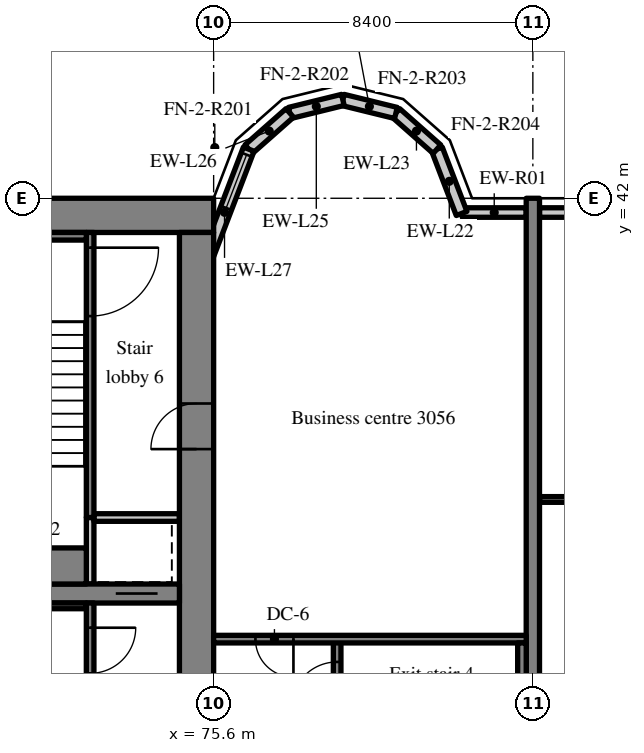
"""IFC4 building model, lengths in metres.
Left out: names, types, materials, properties, quantities, classifications, styles, units other than length and angle.
Written with IfcOpenShell. Run it as: python <this file> out.ifc"""

import sys

from ifc_helpers import new_model, si_unit, direction, frame, frame_2d, origin, place, context, subcontext, project, spatial, rectangle, extrude, source, transform, mapped, element, fill, save


model = new_model("IFC4")
c1 = context("Model", 3, precision=1e-05, world=origin(), true_north=direction((0.0, 1.0)))
c2 = subcontext(c1, "Body", "Model", "MODEL_VIEW")
j1 = project(units=[si_unit("LENGTHUNIT", "METRE"), si_unit("PLANEANGLEUNIT", "RADIAN")], contexts=[c1])
p1 = place(None, origin())
s1 = spatial("IfcSite", under=j1, at=p1, CompositionType="ELEMENT")
p2 = place(p1, origin())
s2 = spatial("IfcBuilding", under=s1, at=p2, CompositionType="ELEMENT")
p3 = place(p2, frame((0.0, 0.0, 125.6)))
s3 = spatial("IfcBuildingStorey", under=s2, at=p3, CompositionType="ELEMENT", Elevation=125.6)
m1 = source(origin(), c2, "Body", "SweptSolid", [
    extrude(rectangle(XDim=50.4, YDim=0.9, at=frame_2d((25.2, 0.0))), origin(), (0.0, 0.0, 1.0), 3.52),
])
p4 = place(p3, frame((25.2, 41.55, 0.0), z_axis=(0.0, 0.0, 1.0), x_axis=(1.0, 0.0, 0.0)))
e1 = element("IfcWall", 1, at=p4, inside=s3, PredefinedType="SHEAR", context=c2, shape_type="MappedRepresentation", body=[
    mapped(m1, transform((0.0, 0.0, 0.0), scale=1.0)),
])
m2 = source(origin(), c2, "Body", "SweptSolid", [
    extrude(rectangle(XDim=18.2, YDim=0.9, at=frame_2d((9.1, 0.0))), origin(), (0.0, 0.0, 1.0), 3.52),
])
p5 = place(p3, frame((75.15, 22.9, 0.0), z_axis=(0.0, 0.0, 1.0), x_axis=(0.0, 1.0, 0.0)))
e2 = element("IfcWall", 2, at=p5, inside=s3, PredefinedType="SHEAR", context=c2, shape_type="MappedRepresentation", body=[
    mapped(m2, transform((0.0, 0.0, 0.0), scale=1.0)),
])
m3 = source(origin(), c2, "Body", "SweptSolid", [
    extrude(rectangle(XDim=1.2, YDim=2.1, at=frame_2d((0.6, 1.05))), frame((0.0, 0.46, 0.0), z_axis=(0.0, -1.0, 0.0), x_axis=(1.0, 0.0, 0.0)), (0.0, 0.0, 1.0), 0.92),
])
p6 = place(p5, frame((12.5, 0.0, 0.0)))
e3 = element("IfcOpeningElement", 3, at=p6, cuts=e2, PredefinedType="OPENING", context=c2, shape_type="MappedRepresentation", body=[
    mapped(m3, transform((0.0, 0.0, 0.0), scale=1.0)),
])
m4 = source(origin(), c2, "Body", "SweptSolid", [
    extrude(rectangle(XDim=7.25, YDim=0.5, at=frame_2d((3.625, 0.0))), origin(), (0.0, 0.0, 1.0), 3.52),
])
p7 = place(p3, frame((67.45, 31.6, 0.0), z_axis=(0.0, 0.0, 1.0), x_axis=(1.0, 0.0, 0.0)))
e4 = element("IfcWall", 4, at=p7, inside=s3, PredefinedType="SHEAR", context=c2, shape_type="MappedRepresentation", body=[
    mapped(m4, transform((0.0, 0.0, 0.0), scale=1.0)),
])
m5 = source(origin(), c2, "Body", "SweptSolid", [
    extrude(rectangle(XDim=1.1, YDim=2.1, at=frame_2d((0.55, 1.05))), frame((0.0, 0.26, 0.0), z_axis=(0.0, -1.0, 0.0), x_axis=(1.0, 0.0, 0.0)), (0.0, 0.0, 1.0), 0.52),
])
p8 = place(p7, frame((5.575, 0.0, 0.0)))
e5 = element("IfcOpeningElement", 5, at=p8, cuts=e4, PredefinedType="OPENING", context=c2, shape_type="MappedRepresentation", body=[
    mapped(m5, transform((0.0, 0.0, 0.0), scale=1.0)),
])
m6 = source(origin(), c2, "Body", "SweptSolid", [
    extrude(rectangle(XDim=20.0, YDim=0.35, at=frame_2d((10.0, 0.0))), origin(), (0.0, 0.0, 1.0), 3.52),
])
p9 = place(p3, frame((84.0, 22.0, 0.0), z_axis=(0.0, 0.0, 1.0), x_axis=(0.0, 1.0, 0.0)))
e6 = element("IfcWall", 6, at=p9, inside=s3, PredefinedType="SHEAR", context=c2, shape_type="MappedRepresentation", body=[
    mapped(m6, transform((0.0, 0.0, 0.0), scale=1.0)),
])
m7 = source(origin(), c2, "Body", "SweptSolid", [
    extrude(rectangle(XDim=1.683, YDim=0.25, at=frame_2d((0.841, 0.0))), origin(), (0.0, 0.0, 1.0), 2.82),
])
p10 = place(p3, frame((83.825, 41.625, 0.0), z_axis=(0.0, 0.0, 1.0), x_axis=(-1.0, 0.0, 0.0)))
e7 = element("IfcWall", 7, at=p10, inside=s3, PredefinedType="SOLIDWALL", context=c2, shape_type="MappedRepresentation", body=[
    mapped(m7, transform((0.0, 0.0, 0.0), scale=1.0)),
])
m8 = source(origin(), c2, "Body", "SweptSolid", [
    extrude(rectangle(XDim=3.675, YDim=0.25, at=frame_2d((1.837, 0.0))), origin(), (0.0, 0.0, 1.0), 2.82),
])
p11 = place(p3, frame((87.85, 41.625, 0.0), z_axis=(0.0, 0.0, 1.0), x_axis=(-1.0, 0.0, 0.0)))
e8 = element("IfcWall", 8, at=p11, inside=s3, PredefinedType="SOLIDWALL", context=c2, shape_type="MappedRepresentation", body=[
    mapped(m8, transform((0.0, 0.0, 0.0), scale=1.0)),
])
m9 = source(origin(), c2, "Body", "SweptSolid", [
    extrude(rectangle(XDim=1.5, YDim=1.5, at=frame_2d((0.75, 0.75))), frame((0.0, 0.135, 0.0), z_axis=(0.0, -1.0, 0.0), x_axis=(1.0, 0.0, 0.0)), (0.0, 0.0, 1.0), 0.27),
])
p12 = place(p11, frame((1.087, 0.0, 0.9)))
e9 = element("IfcOpeningElement", 9, at=p12, cuts=e8, PredefinedType="OPENING", context=c2, shape_type="MappedRepresentation", body=[
    mapped(m9, transform((0.0, 0.0, 0.0), scale=1.0)),
])
m10 = source(origin(), c2, "Body", "SweptSolid", [
    extrude(rectangle(XDim=1.812, YDim=0.3, at=frame_2d((0.906, 0.0))), origin(), (0.0, 0.0, 1.0), 3.52),
])
p13 = place(p3, frame((82.125, 41.6, 0.0), z_axis=(0.0, 0.0, 1.0), x_axis=(-0.357877270961, 0.93376863244, 0.0)))
e10 = element("IfcWall", 10, at=p13, inside=s3, PredefinedType="SOLIDWALL", context=c2, shape_type="MappedRepresentation", body=[
    mapped(m10, transform((0.0, 0.0, 0.0), scale=1.0)),
])
m11 = source(origin(), c2, "Body", "SweptSolid", [
    extrude(rectangle(XDim=1.44, YDim=0.3, at=frame_2d((0.72, 0.0))), origin(), (0.0, 0.0, 1.0), 3.52),
])
p14 = place(p3, frame((81.477, 43.292, 0.0), z_axis=(0.0, 0.0, 1.0), x_axis=(-0.74957555648, 0.661918790432, 0.0)))
e11 = element("IfcWall", 11, at=p14, inside=s3, PredefinedType="SOLIDWALL", context=c2, shape_type="MappedRepresentation", body=[
    mapped(m11, transform((0.0, 0.0, 0.0), scale=1.0)),
])
m12 = source(origin(), c2, "Body", "SweptSolid", [
    extrude(rectangle(XDim=1.439, YDim=0.3, at=frame_2d((0.719, 0.0))), origin(), (0.0, 0.0, 1.0), 3.52),
])
for number, where, z_axis, x_axis in (
    (12, (80.397, 44.245, 0.0), (0.0, 0.0, 1.0), (-0.971, 0.238, 0.0)),
    (13, (79.0, 44.588, 0.0), (0.0, 0.0, 1.0), (-0.971, -0.238, 0.0)),
):
    element("IfcWall", number, at=place(p3, frame(where, z_axis=z_axis, x_axis=x_axis)), inside=s3, PredefinedType="SOLIDWALL", context=c2, shape_type="MappedRepresentation", body=[
        mapped(m12, transform((0.0, 0.0, 0.0), scale=1.0)),
    ])
p15 = place(p3, frame((77.603, 44.245, 0.0), z_axis=(0.0, 0.0, 1.0), x_axis=(-0.74957555648, -0.661918790432, 0.0)))
e14 = element("IfcWall", 14, at=p15, inside=s3, PredefinedType="SOLIDWALL", context=c2, shape_type="MappedRepresentation", body=[
    mapped(m11, transform((0.0, 0.0, 0.0), scale=1.0)),
])
m13 = source(origin(), c2, "Body", "SweptSolid", [
    extrude(rectangle(XDim=3.559, YDim=0.3, at=frame_2d((1.78, 0.0))), origin(), (0.0, 0.0, 1.0), 3.52),
])
p16 = place(p3, frame((76.523, 43.292, 0.0), z_axis=(0.0, 0.0, 1.0), x_axis=(-0.35779745313, -0.933799219604, 0.0)))
e15 = element("IfcWall", 15, at=p16, inside=s3, PredefinedType="SOLIDWALL", context=c2, shape_type="MappedRepresentation", body=[
    mapped(m13, transform((0.0, 0.0, 0.0), scale=1.0)),
])
m14 = source(origin(), c2, "Body", "SweptSolid", [
    extrude(rectangle(XDim=1.5, YDim=2.0, at=frame_2d((0.75, 1.0))), frame((0.0, 0.16, 0.0), z_axis=(0.0, -1.0, 0.0), x_axis=(1.0, 0.0, 0.0)), (0.0, 0.0, 1.0), 0.32),
])
p17 = place(p16, frame((0.156, 0.0, 0.9)))
e16 = element("IfcOpeningElement", 16, at=p17, cuts=e15, PredefinedType="OPENING", context=c2, shape_type="MappedRepresentation", body=[
    mapped(m14, transform((0.0, 0.0, 0.0), scale=1.0)),
])
m15 = source(origin(), c2, "Body", "SweptSolid", [
    extrude(rectangle(XDim=8.45, YDim=0.2, at=frame_2d((4.225, 0.0))), origin(), (0.0, 0.0, 1.0), 3.52),
])
p18 = place(p3, frame((72.35, 22.9, 0.0), z_axis=(0.0, 0.0, 1.0), x_axis=(0.0, 1.0, 0.0)))
e17 = element("IfcWall", 17, at=p18, inside=s3, PredefinedType="SOLIDWALL", context=c2, shape_type="MappedRepresentation", body=[
    mapped(m15, transform((0.0, 0.0, 0.0), scale=1.0)),
])
m16 = source(origin(), c2, "Body", "SweptSolid", [
    extrude(rectangle(XDim=1.2, YDim=2.1, at=frame_2d((0.6, 1.05))), frame((0.0, 0.11, 0.0), z_axis=(0.0, -1.0, 0.0), x_axis=(1.0, 0.0, 0.0)), (0.0, 0.0, 1.0), 0.22),
])
p19 = place(p18, frame((6.6, 0.0, 0.0)))
e18 = element("IfcOpeningElement", 18, at=p19, cuts=e17, PredefinedType="OPENING", context=c2, shape_type="MappedRepresentation", body=[
    mapped(m16, transform((0.0, 0.0, 0.0), scale=1.0)),
])
m17 = source(origin(), c2, "Body", "SweptSolid", [
    extrude(rectangle(XDim=1.75, YDim=0.2, at=frame_2d((0.875, 0.0))), origin(), (0.0, 0.0, 1.0), 3.52),
])
p20 = place(p3, frame((72.35, 31.85, 0.0), z_axis=(0.0, 0.0, 1.0), x_axis=(0.0, 1.0, 0.0)))
e19 = element("IfcWall", 19, at=p20, inside=s3, PredefinedType="SOLIDWALL", context=c2, shape_type="MappedRepresentation", body=[
    mapped(m17, transform((0.0, 0.0, 0.0), scale=1.0)),
])
m18 = source(origin(), c2, "Body", "SweptSolid", [
    extrude(rectangle(XDim=2.25, YDim=0.2, at=frame_2d((1.125, 0.0))), origin(), (0.0, 0.0, 1.0), 3.52),
])
p21 = place(p3, frame((72.45, 33.6, 0.0), z_axis=(0.0, 0.0, 1.0), x_axis=(1.0, 0.0, 0.0)))
e20 = element("IfcWall", 20, at=p21, inside=s3, PredefinedType="SOLIDWALL", context=c2, shape_type="MappedRepresentation", body=[
    mapped(m18, transform((0.0, 0.0, 0.0), scale=1.0)),
])
m19 = source(origin(), c2, "Body", "SweptSolid", [
    extrude(rectangle(XDim=7.5, YDim=0.2, at=frame_2d((3.75, 0.0))), origin(), (0.0, 0.0, 1.0), 3.52),
])
p22 = place(p3, frame((72.35, 33.6, 0.0), z_axis=(0.0, 0.0, 1.0), x_axis=(0.0, 1.0, 0.0)))
e21 = element("IfcWall", 21, at=p22, inside=s3, PredefinedType="SOLIDWALL", context=c2, shape_type="MappedRepresentation", body=[
    mapped(m19, transform((0.0, 0.0, 0.0), scale=1.0)),
])
m20 = source(origin(), c2, "Body", "SweptSolid", [
    extrude(rectangle(XDim=1.8, YDim=2.1, at=frame_2d((0.9, 1.05))), frame((0.0, 0.11, 0.0), z_axis=(0.0, -1.0, 0.0), x_axis=(1.0, 0.0, 0.0)), (0.0, 0.0, 1.0), 0.22),
])
p23 = place(p22, frame((5.3, 0.0, 0.0)))
e22 = element("IfcOpeningElement", 22, at=p23, cuts=e21, PredefinedType="OPENING", context=c2, shape_type="MappedRepresentation", body=[
    mapped(m20, transform((0.0, 0.0, 0.0), scale=1.0)),
])
m21 = source(origin(), c2, "Body", "SweptSolid", [
    extrude(rectangle(XDim=8.3, YDim=0.2, at=frame_2d((4.15, 0.0))), origin(), (0.0, 0.0, 1.0), 3.52),
])
p24 = place(p3, frame((78.85, 22.1, 0.0), z_axis=(0.0, 0.0, 1.0), x_axis=(0.0, 1.0, 0.0)))
e23 = element("IfcWall", 23, at=p24, inside=s3, PredefinedType="SOLIDWALL", context=c2, shape_type="MappedRepresentation", body=[
    mapped(m21, transform((0.0, 0.0, 0.0), scale=1.0)),
])
p25 = place(p24, frame((6.5, 0.0, 0.0)))
e24 = element("IfcOpeningElement", 24, at=p25, cuts=e23, PredefinedType="OPENING", context=c2, shape_type="MappedRepresentation", body=[
    mapped(m16, transform((0.0, 0.0, 0.0), scale=1.0)),
])
m22 = source(origin(), c2, "Body", "SweptSolid", [
    extrude(rectangle(XDim=8.225, YDim=0.2, at=frame_2d((4.112, 0.0))), origin(), (0.0, 0.0, 1.0), 3.52),
])
p26 = place(p3, frame((83.825, 30.4, 0.0), z_axis=(0.0, 0.0, 1.0), x_axis=(-1.0, 0.0, 0.0)))
e25 = element("IfcWall", 25, at=p26, inside=s3, PredefinedType="SOLIDWALL", context=c2, shape_type="MappedRepresentation", body=[
    mapped(m22, transform((0.0, 0.0, 0.0), scale=1.0)),
])
m23 = source(origin(), c2, "Body", "SweptSolid", [
    extrude(rectangle(XDim=1.0, YDim=2.1, at=frame_2d((0.5, 1.05))), frame((0.0, 0.11, 0.0), z_axis=(0.0, -1.0, 0.0), x_axis=(1.0, 0.0, 0.0)), (0.0, 0.0, 1.0), 0.22),
])
p27 = place(p26, frame((6.125, 0.0, 0.0)))
e26 = element("IfcOpeningElement", 26, at=p27, cuts=e25, PredefinedType="OPENING", context=c2, shape_type="MappedRepresentation", body=[
    mapped(m23, transform((0.0, 0.0, 0.0), scale=1.0)),
])
m24 = source(origin(), c2, "Body", "SweptSolid", [
    extrude(rectangle(XDim=4.8, YDim=0.15, at=frame_2d((2.4, 0.0))), origin(), (0.0, 0.0, 1.0), 3.52),
])
p28 = place(p3, frame((67.45, 31.275, 0.0), z_axis=(0.0, 0.0, 1.0), x_axis=(1.0, 0.0, 0.0)))
e27 = element("IfcWall", 27, at=p28, inside=s3, PredefinedType="SOLIDWALL", context=c2, shape_type="MappedRepresentation", body=[
    mapped(m24, transform((0.0, 0.0, 0.0), scale=1.0)),
])
m25 = source(origin(), c2, "Body", "SweptSolid", [
    extrude(rectangle(XDim=4.8, YDim=0.2, at=frame_2d((2.4, 0.0))), origin(), (0.0, 0.0, 1.0), 3.52),
])
p29 = place(p3, frame((67.45, 41.0, 0.0), z_axis=(0.0, 0.0, 1.0), x_axis=(1.0, 0.0, 0.0)))
e28 = element("IfcWall", 28, at=p29, inside=s3, PredefinedType="SOLIDWALL", context=c2, shape_type="MappedRepresentation", body=[
    mapped(m25, transform((0.0, 0.0, 0.0), scale=1.0)),
])
m26 = source(origin(), c2, "Body", "SweptSolid", [
    extrude(rectangle(XDim=4.8, YDim=0.95, at=frame_2d((2.4, 0.0))), origin(), (0.0, 0.0, 1.0), 3.52),
])
p30 = place(p3, frame((67.45, 32.325, 0.0), z_axis=(0.0, 0.0, 1.0), x_axis=(1.0, 0.0, 0.0)))
e29 = element("IfcWall", 29, at=p30, inside=s3, PredefinedType="SOLIDWALL", context=c2, shape_type="MappedRepresentation", body=[
    mapped(m26, transform((0.0, 0.0, 0.0), scale=1.0)),
])
m27 = source(origin(), c2, "Body", "SweptSolid", [
    extrude(rectangle(XDim=8.1, YDim=0.225, at=frame_2d((4.05, 0.0))), origin(), (0.0, 0.0, 1.0), 3.52),
])
p31 = place(p3, frame((83.713, 22.2, 0.0), z_axis=(0.0, 0.0, 1.0), x_axis=(0.0, 1.0, 0.0)))
e30 = element("IfcWall", 30, at=p31, inside=s3, PredefinedType="SOLIDWALL", context=c2, shape_type="MappedRepresentation", body=[
    mapped(m27, transform((0.0, 0.0, 0.0), scale=1.0)),
])
m28 = source(origin(), c2, "Body", "SweptSolid", [
    extrude(rectangle(XDim=8.05, YDim=0.15, at=frame_2d((4.025, 0.0))), origin(), (0.0, 0.0, 1.0), 3.52),
])
p32 = place(p3, frame((84.175, 34.075, 0.0), z_axis=(0.0, 0.0, 1.0), x_axis=(1.0, 0.0, 0.0)))
e31 = element("IfcWall", 31, at=p32, inside=s3, PredefinedType="PARTITIONING", context=c2, shape_type="MappedRepresentation", body=[
    mapped(m28, transform((0.0, 0.0, 0.0), scale=1.0)),
])
m29 = source(origin(), c2, "Body", "SweptSolid", [
    extrude(rectangle(XDim=1.0, YDim=2.1, at=frame_2d((0.5, 1.05))), frame((0.0, 0.085, 0.0), z_axis=(0.0, -1.0, 0.0), x_axis=(1.0, 0.0, 0.0)), (0.0, 0.0, 1.0), 0.17),
])
p33 = place(p32, frame((0.7, 0.0, 0.0)))
e32 = element("IfcOpeningElement", 32, at=p33, cuts=e31, PredefinedType="OPENING", context=c2, shape_type="MappedRepresentation", body=[
    mapped(m29, transform((0.0, 0.0, 0.0), scale=1.0)),
])
m30 = source(origin(), c2, "Body", "SweptSolid", [
    extrude(rectangle(XDim=1.5, YDim=2.0, at=frame_2d((0.75, 1.0))), frame((0.0, 0.03, 0.0), z_axis=(0.0, -1.0, 0.0), x_axis=(1.0, 0.0, 0.0)), (0.0, 0.0, 1.0), 0.06),
])
p34 = place(p17, origin())
e33 = element("IfcWindow", 33, at=p34, inside=s3, PartitioningType="SINGLE_PANEL", PredefinedType="WINDOW", context=c2, shape_type="MappedRepresentation", body=[
    mapped(m30, transform((0.0, 0.0, 0.0), scale=1.0)),
])
fill(e16, e33)
m31 = source(origin(), c2, "Body", "SweptSolid", [
    extrude(rectangle(XDim=1.2, YDim=2.1, at=frame_2d((0.6, 1.05))), frame((0.0, 0.025, 0.0), z_axis=(0.0, -1.0, 0.0), x_axis=(1.0, 0.0, 0.0)), (0.0, 0.0, 1.0), 0.05),
])
p35 = place(p19, origin())
e34 = element("IfcDoor", 34, at=p35, inside=s3, OperationType="SINGLE_SWING_RIGHT", PredefinedType="DOOR", context=c2, shape_type="MappedRepresentation", body=[
    mapped(m31, transform((0.0, 0.0, 0.0), scale=1.0)),
])
fill(e18, e34)
m32 = source(origin(), c2, "Body", "SweptSolid", [
    extrude(rectangle(XDim=1.1, YDim=2.1, at=frame_2d((0.55, 1.05))), frame((0.0, 0.025, 0.0), z_axis=(0.0, -1.0, 0.0), x_axis=(1.0, 0.0, 0.0)), (0.0, 0.0, 1.0), 0.05),
])
p36 = place(p8, origin())
e35 = element("IfcDoor", 35, at=p36, inside=s3, OperationType="SLIDING_TO_LEFT", PredefinedType="DOOR", context=c2, shape_type="MappedRepresentation", body=[
    mapped(m32, transform((0.0, 0.0, 0.0), scale=1.0)),
])
fill(e5, e35)
m33 = source(origin(), c2, "Body", "SweptSolid", [
    extrude(rectangle(XDim=1.8, YDim=2.1, at=frame_2d((0.9, 1.05))), frame((0.0, 0.025, 0.0), z_axis=(0.0, -1.0, 0.0), x_axis=(1.0, 0.0, 0.0)), (0.0, 0.0, 1.0), 0.05),
])
p37 = place(p23, origin())
e36 = element("IfcDoor", 36, at=p37, inside=s3, OperationType="SINGLE_SWING_RIGHT", PredefinedType="DOOR", context=c2, shape_type="MappedRepresentation", body=[
    mapped(m33, transform((0.0, 0.0, 0.0), scale=1.0)),
])
fill(e22, e36)
p38 = place(p6, origin())
e37 = element("IfcDoor", 37, at=p38, inside=s3, OperationType="SINGLE_SWING_LEFT", PredefinedType="DOOR", context=c2, shape_type="MappedRepresentation", body=[
    mapped(m31, transform((0.0, 0.0, 0.0), scale=1.0)),
])
fill(e3, e37)
p39 = place(p25, origin())
e38 = element("IfcDoor", 38, at=p39, inside=s3, OperationType="SINGLE_SWING_LEFT", PredefinedType="DOOR", context=c2, shape_type="MappedRepresentation", body=[
    mapped(m31, transform((0.0, 0.0, 0.0), scale=1.0)),
])
fill(e24, e38)
m34 = source(origin(), c2, "Body", "SweptSolid", [
    extrude(rectangle(XDim=1.0, YDim=2.1, at=frame_2d((0.5, 1.05))), frame((0.0, 0.025, 0.0), z_axis=(0.0, -1.0, 0.0), x_axis=(1.0, 0.0, 0.0)), (0.0, 0.0, 1.0), 0.05),
])
p40 = place(p27, origin())
e39 = element("IfcDoor", 39, at=p40, inside=s3, OperationType="SINGLE_SWING_LEFT", PredefinedType="DOOR", context=c2, shape_type="MappedRepresentation", body=[
    mapped(m34, transform((0.0, 0.0, 0.0), scale=1.0)),
])
fill(e26, e39)
save(model, sys.argv[1])
